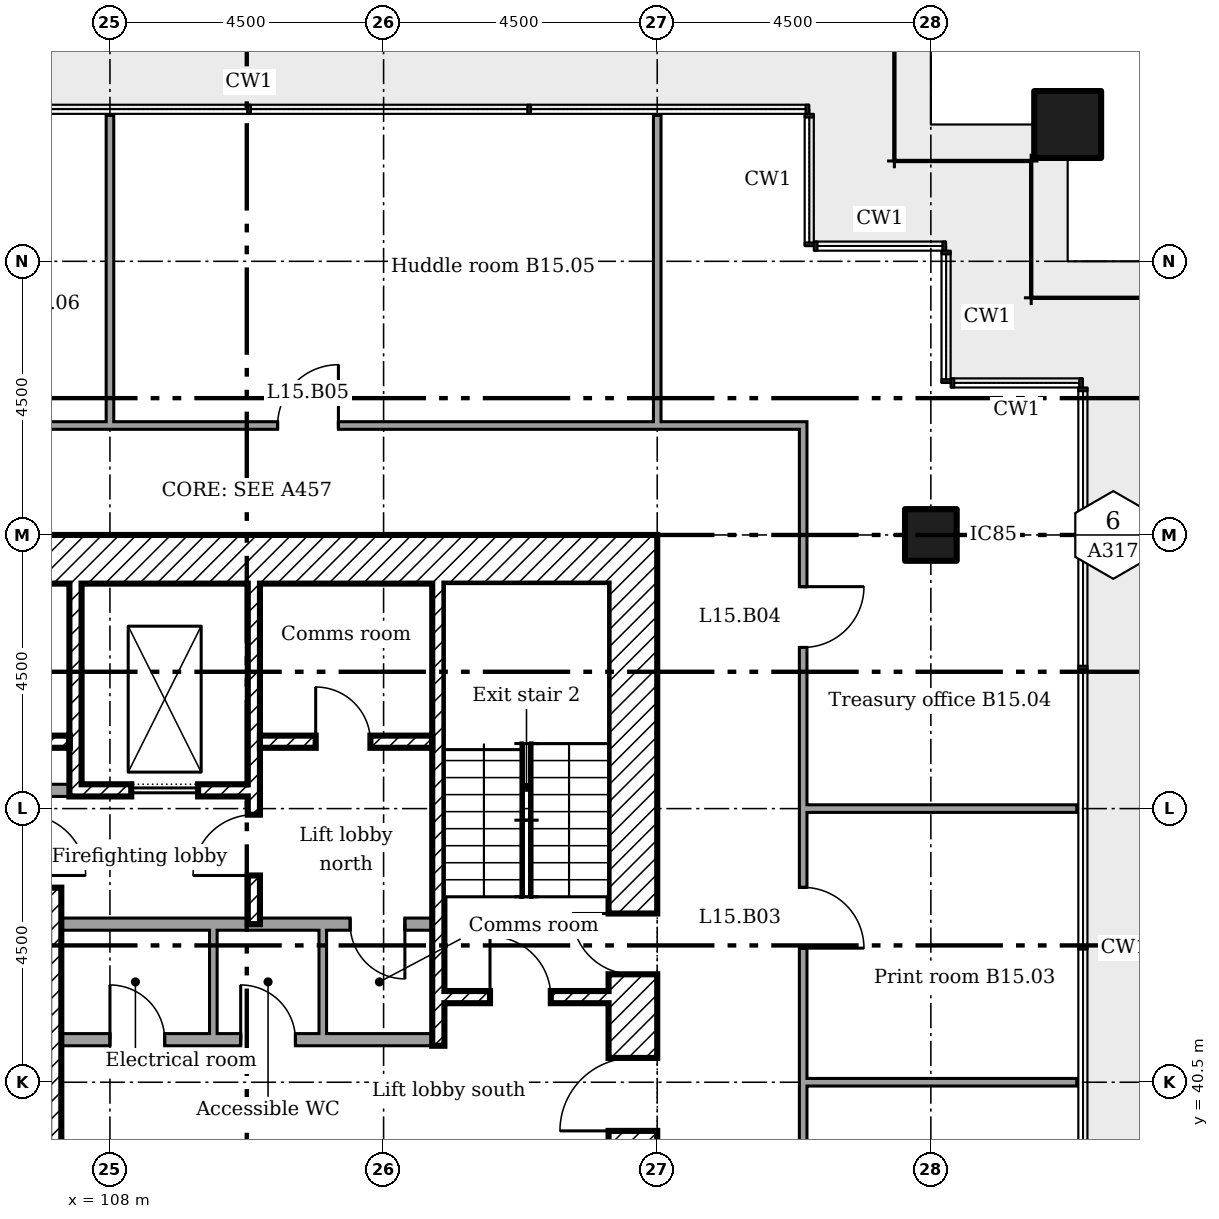
"""IFC4 building model, lengths in metres.
Left out: names, types, materials, properties, quantities, classifications, styles, units other than length and angle.
Written with IfcOpenShell. Run it as: python <this file> out.ifc"""

import sys

from ifc_helpers import new_model, si_unit, direction, frame, frame_2d, origin, origin_2d, place, context, subcontext, project, spatial, rectangle, extrude, element, fill, save


model = new_model("IFC4")
c1 = context("Model", 3, precision=1e-05, world=origin(), true_north=direction((0.0, 1.0)))
c2 = subcontext(c1, "Body", "Model", "MODEL_VIEW")
j1 = project(units=[si_unit("LENGTHUNIT", "METRE"), si_unit("PLANEANGLEUNIT", "RADIAN")], contexts=[c1])
p1 = place(None, origin())
s1 = spatial("IfcSite", under=j1, at=p1, CompositionType="ELEMENT")
p2 = place(p1, origin())
s2 = spatial("IfcBuilding", under=s1, at=p2, CompositionType="ELEMENT")
p3 = place(p2, frame((0.0, 0.0, 65.4)))
s3 = spatial("IfcBuildingStorey", under=s2, at=p3, CompositionType="ELEMENT", Elevation=65.4)
p4 = place(p3, frame((123.75, 56.25, 0.0)))
e1 = element("IfcColumn", 1, at=p4, inside=s3, PredefinedType="COLUMN", context=c2, shape_type="SweptSolid", body=[
    extrude(rectangle(XDim=1.1, YDim=1.1, at=origin_2d()), origin(), (0.0, 0.0, 1.0), 3.6),
])
p5 = place(p3, frame((121.5, 49.5, 0.0)))
e2 = element("IfcColumn", 2, at=p5, inside=s3, PredefinedType="COLUMN", context=c2, shape_type="SweptSolid", body=[
    extrude(rectangle(XDim=0.85, YDim=0.85, at=origin_2d()), origin(), (0.0, 0.0, 1.0), 3.6),
])
p6 = place(p3, frame((116.6, 36.0, 0.0), z_axis=(0.0, 0.0, 1.0), x_axis=(0.0, 1.0, 0.0)))
e3 = element("IfcWall", 3, at=p6, inside=s3, PredefinedType="SHEAR", context=c2, shape_type="SweptSolid", body=[
    extrude(rectangle(XDim=13.5, YDim=0.8, at=frame_2d((6.75, 0.0))), origin(), (0.0, 0.0, 1.0), 3.35),
])
p7 = place(p6, frame((3.7, 0.0, 0.0)))
e4 = element("IfcOpeningElement", 4, at=p7, cuts=e3, PredefinedType="OPENING", context=c2, shape_type="SweptSolid", body=[
    extrude(rectangle(XDim=1.2, YDim=2.1, at=frame_2d((0.6, 1.05))), frame((0.0, 0.41, 0.0), z_axis=(0.0, -1.0, 0.0), x_axis=(1.0, 0.0, 0.0)), (0.0, 0.0, 1.0), 0.82),
])
p8 = place(p6, frame((6.275, 0.0, 0.0)))
e5 = element("IfcOpeningElement", 5, at=p8, cuts=e3, PredefinedType="OPENING", context=c2, shape_type="SweptSolid", body=[
    extrude(rectangle(XDim=1.0, YDim=2.1, at=frame_2d((0.5, 1.05))), frame((0.0, 0.41, 0.0), z_axis=(0.0, -1.0, 0.0), x_axis=(1.0, 0.0, 0.0)), (0.0, 0.0, 1.0), 0.82),
])
p9 = place(p3, frame((104.3, 49.1, 0.0)))
e6 = element("IfcWall", 6, at=p9, inside=s3, PredefinedType="SHEAR", context=c2, shape_type="SweptSolid", body=[
    extrude(rectangle(XDim=11.9, YDim=0.8, at=frame_2d((5.95, 0.0))), origin(), (0.0, 0.0, 1.0), 3.35),
])
p10 = place(p3, frame((107.433, 48.7, 0.0), z_axis=(0.0, 0.0, 1.0), x_axis=(0.0, -1.0, 0.0)))
e7 = element("IfcWall", 7, at=p10, inside=s3, PredefinedType="SHEAR", context=c2, shape_type="SweptSolid", body=[
    extrude(rectangle(XDim=3.5, YDim=0.2, at=frame_2d((1.75, 0.0))), origin(), (0.0, 0.0, 1.0), 3.35),
])
p11 = place(p3, frame((110.367, 48.7, 0.0), z_axis=(0.0, 0.0, 1.0), x_axis=(0.0, -1.0, 0.0)))
e8 = element("IfcWall", 8, at=p11, inside=s3, PredefinedType="SHEAR", context=c2, shape_type="SweptSolid", body=[
    extrude(rectangle(XDim=5.6, YDim=0.2, at=frame_2d((2.8, 0.0))), origin(), (0.0, 0.0, 1.0), 3.35),
])
p12 = place(p11, frame((3.8, 0.0, 0.0)))
e9 = element("IfcOpeningElement", 9, at=p12, cuts=e8, PredefinedType="OPENING", context=c2, shape_type="SweptSolid", body=[
    extrude(rectangle(XDim=1.0, YDim=2.1, at=frame_2d((0.5, 1.05))), frame((0.0, 0.11, 0.0), z_axis=(0.0, -1.0, 0.0), x_axis=(1.0, 0.0, 0.0)), (0.0, 0.0, 1.0), 0.22),
])
p13 = place(p3, frame((106.5, 45.3, 0.0)))
e10 = element("IfcWall", 10, at=p13, inside=s3, PredefinedType="PARTITIONING", context=c2, shape_type="SweptSolid", body=[
    extrude(rectangle(XDim=0.833, YDim=0.2, at=frame_2d((0.417, 0.0))), origin(), (0.0, 0.0, 1.0), 3.35),
])
p14 = place(p3, frame((104.3, 46.1, 0.0)))
e11 = element("IfcWall", 11, at=p14, inside=s3, PredefinedType="SHEAR", context=c2, shape_type="SweptSolid", body=[
    extrude(rectangle(XDim=3.033, YDim=0.2, at=frame_2d((1.517, 0.0))), origin(), (0.0, 0.0, 1.0), 3.35),
])
p15 = place(p14, frame((1.217, 0.0, 0.0)))
e12 = element("IfcOpeningElement", 12, at=p15, cuts=e11, PredefinedType="OPENING", context=c2, shape_type="SweptSolid", body=[
    extrude(rectangle(XDim=0.9, YDim=2.1, at=frame_2d((0.45, 1.05))), frame((0.0, 0.11, 0.0), z_axis=(0.0, -1.0, 0.0), x_axis=(1.0, 0.0, 0.0)), (0.0, 0.0, 1.0), 0.22),
])
p16 = place(p3, frame((110.467, 46.1, 0.0)))
e13 = element("IfcWall", 13, at=p16, inside=s3, PredefinedType="SHEAR", context=c2, shape_type="SweptSolid", body=[
    extrude(rectangle(XDim=2.833, YDim=0.2, at=frame_2d((1.417, 0.0))), origin(), (0.0, 0.0, 1.0), 3.35),
])
p17 = place(p16, frame((0.917, 0.0, 0.0)))
e14 = element("IfcOpeningElement", 14, at=p17, cuts=e13, PredefinedType="OPENING", context=c2, shape_type="SweptSolid", body=[
    extrude(rectangle(XDim=0.9, YDim=2.1, at=frame_2d((0.45, 1.05))), frame((0.0, 0.11, 0.0), z_axis=(0.0, -1.0, 0.0), x_axis=(1.0, 0.0, 0.0)), (0.0, 0.0, 1.0), 0.22),
])
p18 = place(p3, frame((107.533, 45.3, 0.0)))
e15 = element("IfcWall", 15, at=p18, inside=s3, PredefinedType="SHEAR", context=c2, shape_type="SweptSolid", body=[
    extrude(rectangle(XDim=2.733, YDim=0.2, at=frame_2d((1.367, 0.0))), origin(), (0.0, 0.0, 1.0), 3.35),
])
p19 = place(p18, frame((0.817, 0.0, 0.0)))
e16 = element("IfcOpeningElement", 16, at=p19, cuts=e15, PredefinedType="OPENING", context=c2, shape_type="SweptSolid", body=[
    extrude(rectangle(XDim=1.1, YDim=2.1, at=frame_2d((0.55, 1.05))), frame((0.0, 0.11, 0.0), z_axis=(0.0, -1.0, 0.0), x_axis=(1.0, 0.0, 0.0)), (0.0, 0.0, 1.0), 0.22),
])
p20 = place(p3, frame((107.1, 36.8, 0.0), z_axis=(0.0, 0.0, 1.0), x_axis=(0.0, 1.0, 0.0)))
e17 = element("IfcWall", 17, at=p20, inside=s3, PredefinedType="SHEAR", context=c2, shape_type="SweptSolid", body=[
    extrude(rectangle(XDim=6.9, YDim=0.2, at=frame_2d((3.45, 0.0))), origin(), (0.0, 0.0, 1.0), 3.35),
])
p21 = place(p3, frame((113.5, 41.9, 0.0)))
e18 = element("IfcWall", 18, at=p21, inside=s3, PredefinedType="SHEAR", context=c2, shape_type="SweptSolid", body=[
    extrude(rectangle(XDim=2.7, YDim=0.2, at=frame_2d((1.35, 0.0))), origin(), (0.0, 0.0, 1.0), 3.35),
])
p22 = place(p21, frame((0.75, 0.0, 0.0)))
e19 = element("IfcOpeningElement", 19, at=p22, cuts=e18, PredefinedType="OPENING", context=c2, shape_type="SweptSolid", body=[
    extrude(rectangle(XDim=1.0, YDim=2.1, at=frame_2d((0.5, 1.05))), frame((0.0, 0.11, 0.0), z_axis=(0.0, -1.0, 0.0), x_axis=(1.0, 0.0, 0.0)), (0.0, 0.0, 1.0), 0.22),
])
p23 = place(p3, frame((113.4, 41.1, 0.0), z_axis=(0.0, 0.0, 1.0), x_axis=(0.0, 1.0, 0.0)))
e20 = element("IfcWall", 20, at=p23, inside=s3, PredefinedType="SHEAR", context=c2, shape_type="SweptSolid", body=[
    extrude(rectangle(XDim=7.6, YDim=0.2, at=frame_2d((3.8, 0.0))), origin(), (0.0, 0.0, 1.0), 3.35),
])
p24 = place(p3, frame((107.2, 43.1, 0.0)))
e21 = element("IfcWall", 21, at=p24, inside=s3, PredefinedType="PARTITIONING", context=c2, shape_type="SweptSolid", body=[
    extrude(rectangle(XDim=6.1, YDim=0.2, at=frame_2d((3.05, 0.0))), origin(), (0.0, 0.0, 1.0), 3.35),
])
p25 = place(p24, frame((4.75, 0.0, 0.0)))
e22 = element("IfcOpeningElement", 22, at=p25, cuts=e21, PredefinedType="OPENING", context=c2, shape_type="SweptSolid", body=[
    extrude(rectangle(XDim=0.9, YDim=2.1, at=frame_2d((0.45, 1.05))), frame((0.0, 0.11, 0.0), z_axis=(0.0, -1.0, 0.0), x_axis=(1.0, 0.0, 0.0)), (0.0, 0.0, 1.0), 0.22),
])
p26 = place(p3, frame((107.2, 41.2, 0.0)))
e23 = element("IfcWall", 23, at=p26, inside=s3, PredefinedType="PARTITIONING", context=c2, shape_type="SweptSolid", body=[
    extrude(rectangle(XDim=6.1, YDim=0.2, at=frame_2d((3.05, 0.0))), origin(), (0.0, 0.0, 1.0), 3.35),
])
p27 = place(p26, frame((0.8, 0.0, 0.0)))
e24 = element("IfcOpeningElement", 24, at=p27, cuts=e23, PredefinedType="OPENING", context=c2, shape_type="SweptSolid", body=[
    extrude(rectangle(XDim=0.9, YDim=2.1, at=frame_2d((0.45, 1.05))), frame((0.0, 0.11, 0.0), z_axis=(0.0, -1.0, 0.0), x_axis=(1.0, 0.0, 0.0)), (0.0, 0.0, 1.0), 0.22),
])
p28 = place(p26, frame((2.95, 0.0, 0.0)))
e25 = element("IfcOpeningElement", 25, at=p28, cuts=e23, PredefinedType="OPENING", context=c2, shape_type="SweptSolid", body=[
    extrude(rectangle(XDim=0.9, YDim=2.1, at=frame_2d((0.45, 1.05))), frame((0.0, 0.11, 0.0), z_axis=(0.0, -1.0, 0.0), x_axis=(1.0, 0.0, 0.0)), (0.0, 0.0, 1.0), 0.22),
])
for number, where, z_axis, x_axis in (
    (26, (109.7, 41.3, 0.0), (0.0, 0.0, 1.0), (0.0, 1.0, 0.0)),
    (27, (111.5, 41.3, 0.0), (0.0, 0.0, 1.0), (0.0, 1.0, 0.0)),
):
    element("IfcWall", number, at=place(p3, frame(where, z_axis=z_axis, x_axis=x_axis)), inside=s3, PredefinedType="PARTITIONING", context=c2, shape_type="SweptSolid", body=[
        extrude(rectangle(XDim=1.7, YDim=0.125, at=frame_2d((0.85, 0.0))), origin(), (0.0, 0.0, 1.0), 3.35),
    ])
for number, where in (
    (28, (119.4, 40.5, 0.0)),
    (29, (119.4, 45.0, 0.0)),
):
    element("IfcWall", number, at=place(p3, frame(where)), inside=s3, PredefinedType="PARTITIONING", context=c2, shape_type="SweptSolid", body=[
        extrude(rectangle(XDim=4.5, YDim=0.125, at=frame_2d((2.25, 0.0))), origin(), (0.0, 0.0, 1.0), 2.851),
    ])
p29 = place(p3, frame((100.137, 51.3, 0.0)))
e30 = element("IfcWall", 30, at=p29, inside=s3, PredefinedType="PARTITIONING", context=c2, shape_type="SweptSolid", body=[
    extrude(rectangle(XDim=19.325, YDim=0.125, at=frame_2d((9.663, 0.0))), origin(), (0.0, 0.0, 1.0), 3.45),
])
p30 = place(p29, frame((10.619, 0.0, 0.0)))
e31 = element("IfcOpeningElement", 31, at=p30, cuts=e30, PredefinedType="OPENING", context=c2, shape_type="SweptSolid", body=[
    extrude(rectangle(XDim=1.0, YDim=2.1, at=frame_2d((0.5, 1.05))), frame((0.0, 0.073, 0.0), z_axis=(0.0, -1.0, 0.0), x_axis=(1.0, 0.0, 0.0)), (0.0, 0.0, 1.0), 0.145),
])
p31 = place(p29, frame((4.69, 0.0, 0.0)))
e32 = element("IfcOpeningElement", 32, at=p31, cuts=e30, PredefinedType="OPENING", context=c2, shape_type="SweptSolid", body=[
    extrude(rectangle(XDim=1.0, YDim=2.1, at=frame_2d((0.5, 1.05))), frame((0.0, 0.073, 0.0), z_axis=(0.0, -1.0, 0.0), x_axis=(1.0, 0.0, 0.0)), (0.0, 0.0, 1.0), 0.145),
])
for number, where, z_axis, x_axis in (
    (33, (108.0, 51.3, 0.0), (0.0, 0.0, 1.0), (0.0, 1.0, 0.0)),
    (34, (117.0, 51.3, 0.0), (0.0, 0.0, 1.0), (0.0, 1.0, 0.0)),
):
    element("IfcWall", number, at=place(p3, frame(where, z_axis=z_axis, x_axis=x_axis)), inside=s3, PredefinedType="PARTITIONING", context=c2, shape_type="SweptSolid", body=[
        extrude(rectangle(XDim=5.1, YDim=0.125, at=frame_2d((2.55, 0.0))), origin(), (0.0, 0.0, 1.0), 2.851),
    ])
p32 = place(p3, frame((119.4, 33.363, 0.0), z_axis=(0.0, 0.0, 1.0), x_axis=(0.0, 1.0, 0.0)))
e35 = element("IfcWall", 35, at=p32, inside=s3, PredefinedType="PARTITIONING", context=c2, shape_type="SweptSolid", body=[
    extrude(rectangle(XDim=17.875, YDim=0.125, at=frame_2d((8.938, 0.0))), origin(), (0.0, 0.0, 1.0), 3.45),
])
p33 = place(p32, frame((2.11, 0.0, 0.0)))
e36 = element("IfcOpeningElement", 36, at=p33, cuts=e35, PredefinedType="OPENING", context=c2, shape_type="SweptSolid", body=[
    extrude(rectangle(XDim=1.0, YDim=2.1, at=frame_2d((0.5, 1.05))), frame((0.0, 0.073, 0.0), z_axis=(0.0, -1.0, 0.0), x_axis=(1.0, 0.0, 0.0)), (0.0, 0.0, 1.0), 0.145),
])
p34 = place(p32, frame((9.343, 0.0, 0.0)))
e37 = element("IfcOpeningElement", 37, at=p34, cuts=e35, PredefinedType="OPENING", context=c2, shape_type="SweptSolid", body=[
    extrude(rectangle(XDim=1.0, YDim=2.1, at=frame_2d((0.5, 1.05))), frame((0.0, 0.073, 0.0), z_axis=(0.0, -1.0, 0.0), x_axis=(1.0, 0.0, 0.0)), (0.0, 0.0, 1.0), 0.145),
])
p35 = place(p32, frame((14.288, 0.0, 0.0)))
e38 = element("IfcOpeningElement", 38, at=p35, cuts=e35, PredefinedType="OPENING", context=c2, shape_type="SweptSolid", body=[
    extrude(rectangle(XDim=1.0, YDim=2.1, at=frame_2d((0.5, 1.05))), frame((0.0, 0.073, 0.0), z_axis=(0.0, -1.0, 0.0), x_axis=(1.0, 0.0, 0.0)), (0.0, 0.0, 1.0), 0.145),
])
p36 = place(p7, origin())
e39 = element("IfcDoor", 39, at=p36, inside=s3, OperationType="SINGLE_SWING_RIGHT", PredefinedType="DOOR", context=c2, shape_type="SweptSolid", body=[
    extrude(rectangle(XDim=1.2, YDim=2.1, at=frame_2d((0.6, 1.05))), frame((0.0, 0.025, 0.0), z_axis=(0.0, -1.0, 0.0), x_axis=(1.0, 0.0, 0.0)), (0.0, 0.0, 1.0), 0.05),
])
fill(e4, e39)
p37 = place(p22, origin())
e40 = element("IfcDoor", 40, at=p37, inside=s3, OperationType="SINGLE_SWING_RIGHT", PredefinedType="DOOR", context=c2, shape_type="SweptSolid", body=[
    extrude(rectangle(XDim=1.0, YDim=2.1, at=frame_2d((0.5, 1.05))), frame((0.0, 0.025, 0.0), z_axis=(0.0, -1.0, 0.0), x_axis=(1.0, 0.0, 0.0)), (0.0, 0.0, 1.0), 0.05),
])
fill(e19, e40)
p38 = place(p8, origin())
e41 = element("IfcDoor", 41, at=p38, inside=s3, OperationType="SINGLE_SWING_LEFT", PredefinedType="DOOR", context=c2, shape_type="SweptSolid", body=[
    extrude(rectangle(XDim=1.0, YDim=2.1, at=frame_2d((0.5, 1.05))), frame((0.0, 0.025, 0.0), z_axis=(0.0, -1.0, 0.0), x_axis=(1.0, 0.0, 0.0)), (0.0, 0.0, 1.0), 0.05),
])
fill(e5, e41)
p39 = place(p12, frame((1.0, 0.0, 0.0), x_axis=(-1.0, 0.0, 0.0)))
e42 = element("IfcDoor", 42, at=p39, inside=s3, OperationType="SINGLE_SWING_RIGHT", PredefinedType="DOOR", context=c2, shape_type="SweptSolid", body=[
    extrude(rectangle(XDim=1.0, YDim=2.1, at=frame_2d((0.5, 1.05))), frame((0.0, 0.025, 0.0), z_axis=(0.0, -1.0, 0.0), x_axis=(1.0, 0.0, 0.0)), (0.0, 0.0, 1.0), 0.05),
])
fill(e9, e42)
p40 = place(p17, origin())
e43 = element("IfcDoor", 43, at=p40, inside=s3, OperationType="SINGLE_SWING_RIGHT", PredefinedType="DOOR", context=c2, shape_type="SweptSolid", body=[
    extrude(rectangle(XDim=0.9, YDim=2.1, at=frame_2d((0.45, 1.05))), frame((0.0, 0.025, 0.0), z_axis=(0.0, -1.0, 0.0), x_axis=(1.0, 0.0, 0.0)), (0.0, 0.0, 1.0), 0.05),
])
fill(e14, e43)
p41 = place(p27, origin())
e44 = element("IfcDoor", 44, at=p41, inside=s3, OperationType="SINGLE_SWING_RIGHT", PredefinedType="DOOR", context=c2, shape_type="SweptSolid", body=[
    extrude(rectangle(XDim=0.9, YDim=2.1, at=frame_2d((0.45, 1.05))), frame((0.0, 0.025, 0.0), z_axis=(0.0, -1.0, 0.0), x_axis=(1.0, 0.0, 0.0)), (0.0, 0.0, 1.0), 0.05),
])
fill(e24, e44)
p42 = place(p28, origin())
e45 = element("IfcDoor", 45, at=p42, inside=s3, OperationType="SINGLE_SWING_RIGHT", PredefinedType="DOOR", context=c2, shape_type="SweptSolid", body=[
    extrude(rectangle(XDim=0.9, YDim=2.1, at=frame_2d((0.45, 1.05))), frame((0.0, 0.025, 0.0), z_axis=(0.0, -1.0, 0.0), x_axis=(1.0, 0.0, 0.0)), (0.0, 0.0, 1.0), 0.05),
])
fill(e25, e45)
p43 = place(p25, frame((0.9, 0.0, 0.0), x_axis=(-1.0, 0.0, 0.0)))
e46 = element("IfcDoor", 46, at=p43, inside=s3, OperationType="SINGLE_SWING_RIGHT", PredefinedType="DOOR", context=c2, shape_type="SweptSolid", body=[
    extrude(rectangle(XDim=0.9, YDim=2.1, at=frame_2d((0.45, 1.05))), frame((0.0, 0.025, 0.0), z_axis=(0.0, -1.0, 0.0), x_axis=(1.0, 0.0, 0.0)), (0.0, 0.0, 1.0), 0.05),
])
fill(e22, e46)
p44 = place(p19, origin())
e47 = element("IfcDoor", 47, at=p44, inside=s3, OperationType="SLIDING_TO_LEFT", PredefinedType="DOOR", context=c2, shape_type="SweptSolid", body=[
    extrude(rectangle(XDim=1.1, YDim=2.1, at=frame_2d((0.55, 1.05))), frame((0.0, 0.025, 0.0), z_axis=(0.0, -1.0, 0.0), x_axis=(1.0, 0.0, 0.0)), (0.0, 0.0, 1.0), 0.05),
])
fill(e16, e47)
p45 = place(p34, frame((1.0, 0.0, 0.0), x_axis=(-1.0, 0.0, 0.0)))
e48 = element("IfcDoor", 48, at=p45, inside=s3, OperationType="SINGLE_SWING_LEFT", PredefinedType="DOOR", context=c2, shape_type="SweptSolid", body=[
    extrude(rectangle(XDim=1.0, YDim=2.1, at=frame_2d((0.5, 1.05))), frame((0.0, 0.025, 0.0), z_axis=(0.0, -1.0, 0.0), x_axis=(1.0, 0.0, 0.0)), (0.0, 0.0, 1.0), 0.05),
])
fill(e37, e48)
p46 = place(p35, frame((1.0, 0.0, 0.0), x_axis=(-1.0, 0.0, 0.0)))
e49 = element("IfcDoor", 49, at=p46, inside=s3, OperationType="SINGLE_SWING_RIGHT", PredefinedType="DOOR", context=c2, shape_type="SweptSolid", body=[
    extrude(rectangle(XDim=1.0, YDim=2.1, at=frame_2d((0.5, 1.05))), frame((0.0, 0.025, 0.0), z_axis=(0.0, -1.0, 0.0), x_axis=(1.0, 0.0, 0.0)), (0.0, 0.0, 1.0), 0.05),
])
fill(e38, e49)
p47 = place(p30, origin())
e50 = element("IfcDoor", 50, at=p47, inside=s3, OperationType="SINGLE_SWING_LEFT", PredefinedType="DOOR", context=c2, shape_type="SweptSolid", body=[
    extrude(rectangle(XDim=1.0, YDim=2.1, at=frame_2d((0.5, 1.05))), frame((0.0, 0.025, 0.0), z_axis=(0.0, -1.0, 0.0), x_axis=(1.0, 0.0, 0.0)), (0.0, 0.0, 1.0), 0.05),
])
fill(e31, e50)
save(model, sys.argv[1])
